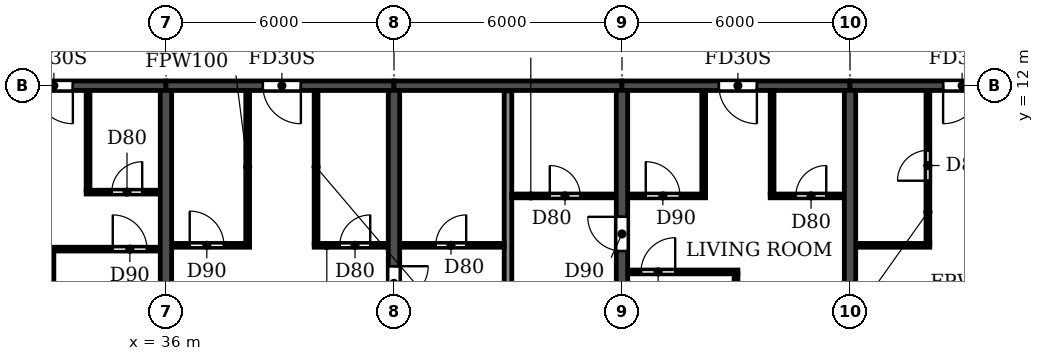
"""IFC4 building model, lengths in metres.
Left out: names, types, materials, properties, quantities, classifications, styles, units other than length and angle.
Written with IfcOpenShell. Run it as: python <this file> out.ifc"""

import sys

from ifc_helpers import new_model, si_unit, direction, frame, frame_2d, origin, place, context, subcontext, project, spatial, rectangle, extrude, element, fill, save


model = new_model("IFC4")
c1 = context("Model", 3, precision=1e-05, world=origin(), true_north=direction((0.0, 1.0)))
c2 = subcontext(c1, "Body", "Model", "MODEL_VIEW")
j1 = project(units=[si_unit("LENGTHUNIT", "METRE"), si_unit("PLANEANGLEUNIT", "RADIAN")], contexts=[c1])
p1 = place(None, origin())
s1 = spatial("IfcSite", under=j1, at=p1, CompositionType="ELEMENT")
p2 = place(p1, origin())
s2 = spatial("IfcBuilding", under=s1, at=p2, CompositionType="ELEMENT")
p3 = place(p2, frame((0.0, 0.0, 125.7)))
s3 = spatial("IfcBuildingStorey", under=s2, at=p3, CompositionType="ELEMENT", Elevation=125.7)
p4 = place(p3, frame((36.0, 0.2, 0.0), z_axis=(0.0, 0.0, 1.0), x_axis=(0.0, 1.0, 0.0)))
e1 = element("IfcWall", 1, at=p4, inside=s3, PredefinedType="SHEAR", context=c2, shape_type="SweptSolid", body=[
    extrude(rectangle(XDim=11.675, YDim=0.3, at=frame_2d((5.837, 0.0))), origin(), (0.0, 0.0, 1.0), 3.07),
])
p5 = place(p3, frame((42.0, 0.2, 0.0), z_axis=(0.0, 0.0, 1.0), x_axis=(0.0, 1.0, 0.0)))
e2 = element("IfcWall", 2, at=p5, inside=s3, PredefinedType="SHEAR", context=c2, shape_type="SweptSolid", body=[
    extrude(rectangle(XDim=11.675, YDim=0.3, at=frame_2d((5.837, 0.0))), origin(), (0.0, 0.0, 1.0), 3.07),
])
p6 = place(p5, frame((6.15, 0.0, 0.0)))
e3 = element("IfcOpeningElement", 3, at=p6, cuts=e2, PredefinedType="OPENING", context=c2, shape_type="SweptSolid", body=[
    extrude(rectangle(XDim=0.9, YDim=2.1, at=frame_2d((0.45, 1.05))), frame((0.0, 0.16, 0.0), z_axis=(0.0, -1.0, 0.0), x_axis=(1.0, 0.0, 0.0)), (0.0, 0.0, 1.0), 0.32),
])
p7 = place(p3, frame((48.0, 0.2, 0.0), z_axis=(0.0, 0.0, 1.0), x_axis=(0.0, 1.0, 0.0)))
e4 = element("IfcWall", 4, at=p7, inside=s3, PredefinedType="SHEAR", context=c2, shape_type="SweptSolid", body=[
    extrude(rectangle(XDim=11.675, YDim=0.3, at=frame_2d((5.837, 0.0))), origin(), (0.0, 0.0, 1.0), 3.07),
])
p8 = place(p7, frame((7.45, 0.0, 0.0)))
e5 = element("IfcOpeningElement", 5, at=p8, cuts=e4, PredefinedType="OPENING", context=c2, shape_type="SweptSolid", body=[
    extrude(rectangle(XDim=0.9, YDim=2.1, at=frame_2d((0.45, 1.05))), frame((0.0, 0.16, 0.0), z_axis=(0.0, -1.0, 0.0), x_axis=(1.0, 0.0, 0.0)), (0.0, 0.0, 1.0), 0.32),
])
p9 = place(p3, frame((54.0, 0.2, 0.0), z_axis=(0.0, 0.0, 1.0), x_axis=(0.0, 1.0, 0.0)))
e6 = element("IfcWall", 6, at=p9, inside=s3, PredefinedType="SHEAR", context=c2, shape_type="SweptSolid", body=[
    extrude(rectangle(XDim=11.675, YDim=0.3, at=frame_2d((5.837, 0.0))), origin(), (0.0, 0.0, 1.0), 3.07),
])
p10 = place(p3, frame((30.0, 12.0, 0.0), z_axis=(0.0, 0.0, 1.0), x_axis=(1.0, 0.0, 0.0)))
e7 = element("IfcWall", 7, at=p10, inside=s3, PredefinedType="SHEAR", context=c2, shape_type="SweptSolid", body=[
    extrude(rectangle(XDim=6.0, YDim=0.25, at=frame_2d((3.0, 0.0))), origin(), (0.0, 0.0, 1.0), 2.47),
])
p11 = place(p10, frame((2.55, 0.0, 0.0)))
e8 = element("IfcOpeningElement", 8, at=p11, cuts=e7, PredefinedType="OPENING", context=c2, shape_type="SweptSolid", body=[
    extrude(rectangle(XDim=1.0, YDim=2.1, at=frame_2d((0.5, 1.05))), frame((0.0, 0.135, 0.0), z_axis=(0.0, -1.0, 0.0), x_axis=(1.0, 0.0, 0.0)), (0.0, 0.0, 1.0), 0.27),
])
p12 = place(p3, frame((36.0, 12.0, 0.0), z_axis=(0.0, 0.0, 1.0), x_axis=(1.0, 0.0, 0.0)))
e9 = element("IfcWall", 9, at=p12, inside=s3, PredefinedType="SHEAR", context=c2, shape_type="SweptSolid", body=[
    extrude(rectangle(XDim=6.0, YDim=0.25, at=frame_2d((3.0, 0.0))), origin(), (0.0, 0.0, 1.0), 2.47),
])
p13 = place(p12, frame((2.55, 0.0, 0.0)))
e10 = element("IfcOpeningElement", 10, at=p13, cuts=e9, PredefinedType="OPENING", context=c2, shape_type="SweptSolid", body=[
    extrude(rectangle(XDim=1.0, YDim=2.1, at=frame_2d((0.5, 1.05))), frame((0.0, 0.135, 0.0), z_axis=(0.0, -1.0, 0.0), x_axis=(1.0, 0.0, 0.0)), (0.0, 0.0, 1.0), 0.27),
])
p14 = place(p3, frame((42.0, 12.0, 0.0), z_axis=(0.0, 0.0, 1.0), x_axis=(1.0, 0.0, 0.0)))
e11 = element("IfcWall", 11, at=p14, inside=s3, PredefinedType="SHEAR", context=c2, shape_type="SweptSolid", body=[
    extrude(rectangle(XDim=6.0, YDim=0.25, at=frame_2d((3.0, 0.0))), origin(), (0.0, 0.0, 1.0), 2.47),
])
p15 = place(p3, frame((48.0, 12.0, 0.0), z_axis=(0.0, 0.0, 1.0), x_axis=(1.0, 0.0, 0.0)))
e12 = element("IfcWall", 12, at=p15, inside=s3, PredefinedType="SHEAR", context=c2, shape_type="SweptSolid", body=[
    extrude(rectangle(XDim=6.0, YDim=0.25, at=frame_2d((3.0, 0.0))), origin(), (0.0, 0.0, 1.0), 2.47),
])
p16 = place(p15, frame((2.55, 0.0, 0.0)))
e13 = element("IfcOpeningElement", 13, at=p16, cuts=e12, PredefinedType="OPENING", context=c2, shape_type="SweptSolid", body=[
    extrude(rectangle(XDim=1.0, YDim=2.1, at=frame_2d((0.5, 1.05))), frame((0.0, 0.135, 0.0), z_axis=(0.0, -1.0, 0.0), x_axis=(1.0, 0.0, 0.0)), (0.0, 0.0, 1.0), 0.27),
])
p17 = place(p3, frame((54.0, 12.0, 0.0), z_axis=(0.0, 0.0, 1.0), x_axis=(1.0, 0.0, 0.0)))
e14 = element("IfcWall", 14, at=p17, inside=s3, PredefinedType="SHEAR", context=c2, shape_type="SweptSolid", body=[
    extrude(rectangle(XDim=6.0, YDim=0.25, at=frame_2d((3.0, 0.0))), origin(), (0.0, 0.0, 1.0), 2.47),
])
p18 = place(p17, frame((2.45, 0.0, 0.0)))
e15 = element("IfcOpeningElement", 15, at=p18, cuts=e14, PredefinedType="OPENING", context=c2, shape_type="SweptSolid", body=[
    extrude(rectangle(XDim=1.0, YDim=2.1, at=frame_2d((0.5, 1.05))), frame((0.0, 0.135, 0.0), z_axis=(0.0, -1.0, 0.0), x_axis=(1.0, 0.0, 0.0)), (0.0, 0.0, 1.0), 0.27),
])
p19 = place(p3, frame((45.0, 0.06, 0.0), z_axis=(0.0, 0.0, 1.0), x_axis=(0.0, 1.0, 0.0)))
e16 = element("IfcWall", 16, at=p19, inside=s3, PredefinedType="PARTITIONING", context=c2, shape_type="SweptSolid", body=[
    extrude(rectangle(XDim=11.805, YDim=0.2, at=frame_2d((5.902, 0.0))), origin(), (0.0, 0.0, 1.0), 3.07),
])
p20 = place(p3, frame((48.16, 7.1, 0.0), z_axis=(0.0, 0.0, 1.0), x_axis=(1.0, 0.0, 0.0)))
e17 = element("IfcWall", 17, at=p20, inside=s3, PredefinedType="PARTITIONING", context=c2, shape_type="SweptSolid", body=[
    extrude(rectangle(XDim=2.89, YDim=0.1, at=frame_2d((1.445, 0.0))), origin(), (0.0, 0.0, 1.0), 3.07),
])
p21 = place(p20, frame((0.34, 0.0, 0.0)))
e18 = element("IfcOpeningElement", 18, at=p21, cuts=e17, PredefinedType="OPENING", context=c2, shape_type="SweptSolid", body=[
    extrude(rectangle(XDim=0.9, YDim=2.1, at=frame_2d((0.45, 1.05))), frame((0.0, 0.06, 0.0), z_axis=(0.0, -1.0, 0.0), x_axis=(1.0, 0.0, 0.0)), (0.0, 0.0, 1.0), 0.12),
])
p22 = place(p3, frame((32.95, 7.7, 0.0), z_axis=(0.0, 0.0, 1.0), x_axis=(1.0, 0.0, 0.0)))
e19 = element("IfcWall", 19, at=p22, inside=s3, PredefinedType="PARTITIONING", context=c2, shape_type="SweptSolid", body=[
    extrude(rectangle(XDim=2.89, YDim=0.1, at=frame_2d((1.445, 0.0))), origin(), (0.0, 0.0, 1.0), 3.07),
])
p23 = place(p22, frame((1.65, 0.0, 0.0)))
e20 = element("IfcOpeningElement", 20, at=p23, cuts=e19, PredefinedType="OPENING", context=c2, shape_type="SweptSolid", body=[
    extrude(rectangle(XDim=0.9, YDim=2.1, at=frame_2d((0.45, 1.05))), frame((0.0, 0.06, 0.0), z_axis=(0.0, -1.0, 0.0), x_axis=(1.0, 0.0, 0.0)), (0.0, 0.0, 1.0), 0.12),
])
p24 = place(p3, frame((36.16, 7.8, 0.0), z_axis=(0.0, 0.0, 1.0), x_axis=(1.0, 0.0, 0.0)))
e21 = element("IfcWall", 21, at=p24, inside=s3, PredefinedType="PARTITIONING", context=c2, shape_type="SweptSolid", body=[
    extrude(rectangle(XDim=2.04, YDim=0.1, at=frame_2d((1.02, 0.0))), origin(), (0.0, 0.0, 1.0), 3.07),
])
p25 = place(p24, frame((0.465, 0.0, 0.0)))
e22 = element("IfcOpeningElement", 22, at=p25, cuts=e21, PredefinedType="OPENING", context=c2, shape_type="SweptSolid", body=[
    extrude(rectangle(XDim=0.9, YDim=2.1, at=frame_2d((0.45, 1.05))), frame((0.0, 0.06, 0.0), z_axis=(0.0, -1.0, 0.0), x_axis=(1.0, 0.0, 0.0)), (0.0, 0.0, 1.0), 0.12),
])
p26 = place(p3, frame((39.9, 7.8, 0.0), z_axis=(0.0, 0.0, 1.0), x_axis=(1.0, 0.0, 0.0)))
e23 = element("IfcWall", 23, at=p26, inside=s3, PredefinedType="PARTITIONING", context=c2, shape_type="SweptSolid", body=[
    extrude(rectangle(XDim=1.94, YDim=0.1, at=frame_2d((0.97, 0.0))), origin(), (0.0, 0.0, 1.0), 3.07),
])
p27 = place(p26, frame((0.675, 0.0, 0.0)))
e24 = element("IfcOpeningElement", 24, at=p27, cuts=e23, PredefinedType="OPENING", context=c2, shape_type="SweptSolid", body=[
    extrude(rectangle(XDim=0.8, YDim=2.1, at=frame_2d((0.4, 1.05))), frame((0.0, 0.06, 0.0), z_axis=(0.0, -1.0, 0.0), x_axis=(1.0, 0.0, 0.0)), (0.0, 0.0, 1.0), 0.12),
])
p28 = place(p3, frame((42.16, 7.8, 0.0), z_axis=(0.0, 0.0, 1.0), x_axis=(1.0, 0.0, 0.0)))
e25 = element("IfcWall", 25, at=p28, inside=s3, PredefinedType="PARTITIONING", context=c2, shape_type="SweptSolid", body=[
    extrude(rectangle(XDim=2.74, YDim=0.1, at=frame_2d((1.37, 0.0))), origin(), (0.0, 0.0, 1.0), 3.07),
])
p29 = place(p28, frame((0.94, 0.0, 0.0)))
e26 = element("IfcOpeningElement", 26, at=p29, cuts=e25, PredefinedType="OPENING", context=c2, shape_type="SweptSolid", body=[
    extrude(rectangle(XDim=0.8, YDim=2.1, at=frame_2d((0.4, 1.05))), frame((0.0, 0.06, 0.0), z_axis=(0.0, -1.0, 0.0), x_axis=(1.0, 0.0, 0.0)), (0.0, 0.0, 1.0), 0.12),
])
p30 = place(p3, frame((54.16, 7.8, 0.0), z_axis=(0.0, 0.0, 1.0), x_axis=(1.0, 0.0, 0.0)))
e27 = element("IfcWall", 27, at=p30, inside=s3, PredefinedType="PARTITIONING", context=c2, shape_type="SweptSolid", body=[
    extrude(rectangle(XDim=1.94, YDim=0.1, at=frame_2d((0.97, 0.0))), origin(), (0.0, 0.0, 1.0), 3.07),
])
p31 = place(p3, frame((45.1, 9.1, 0.0), z_axis=(0.0, 0.0, 1.0), x_axis=(1.0, 0.0, 0.0)))
e28 = element("IfcWall", 28, at=p31, inside=s3, PredefinedType="PARTITIONING", context=c2, shape_type="SweptSolid", body=[
    extrude(rectangle(XDim=2.74, YDim=0.1, at=frame_2d((1.37, 0.0))), origin(), (0.0, 0.0, 1.0), 3.07),
])
p32 = place(p31, frame((1.0, 0.0, 0.0)))
e29 = element("IfcOpeningElement", 29, at=p32, cuts=e28, PredefinedType="OPENING", context=c2, shape_type="SweptSolid", body=[
    extrude(rectangle(XDim=0.8, YDim=2.1, at=frame_2d((0.4, 1.05))), frame((0.0, 0.06, 0.0), z_axis=(0.0, -1.0, 0.0), x_axis=(1.0, 0.0, 0.0)), (0.0, 0.0, 1.0), 0.12),
])
p33 = place(p3, frame((48.16, 9.1, 0.0), z_axis=(0.0, 0.0, 1.0), x_axis=(1.0, 0.0, 0.0)))
e30 = element("IfcWall", 30, at=p33, inside=s3, PredefinedType="PARTITIONING", context=c2, shape_type="SweptSolid", body=[
    extrude(rectangle(XDim=2.04, YDim=0.1, at=frame_2d((1.02, 0.0))), origin(), (0.0, 0.0, 1.0), 3.07),
])
p34 = place(p33, frame((0.465, 0.0, 0.0)))
e31 = element("IfcOpeningElement", 31, at=p34, cuts=e30, PredefinedType="OPENING", context=c2, shape_type="SweptSolid", body=[
    extrude(rectangle(XDim=0.9, YDim=2.1, at=frame_2d((0.45, 1.05))), frame((0.0, 0.06, 0.0), z_axis=(0.0, -1.0, 0.0), x_axis=(1.0, 0.0, 0.0)), (0.0, 0.0, 1.0), 0.12),
])
p35 = place(p3, frame((51.9, 9.1, 0.0), z_axis=(0.0, 0.0, 1.0), x_axis=(1.0, 0.0, 0.0)))
e32 = element("IfcWall", 32, at=p35, inside=s3, PredefinedType="PARTITIONING", context=c2, shape_type="SweptSolid", body=[
    extrude(rectangle(XDim=1.94, YDim=0.1, at=frame_2d((0.97, 0.0))), origin(), (0.0, 0.0, 1.0), 3.07),
])
p36 = place(p35, frame((0.675, 0.0, 0.0)))
e33 = element("IfcOpeningElement", 33, at=p36, cuts=e32, PredefinedType="OPENING", context=c2, shape_type="SweptSolid", body=[
    extrude(rectangle(XDim=0.8, YDim=2.1, at=frame_2d((0.4, 1.05))), frame((0.0, 0.06, 0.0), z_axis=(0.0, -1.0, 0.0), x_axis=(1.0, 0.0, 0.0)), (0.0, 0.0, 1.0), 0.12),
])
p37 = place(p3, frame((33.9, 9.2, 0.0), z_axis=(0.0, 0.0, 1.0), x_axis=(1.0, 0.0, 0.0)))
e34 = element("IfcWall", 34, at=p37, inside=s3, PredefinedType="PARTITIONING", context=c2, shape_type="SweptSolid", body=[
    extrude(rectangle(XDim=1.94, YDim=0.1, at=frame_2d((0.97, 0.0))), origin(), (0.0, 0.0, 1.0), 3.07),
])
p38 = place(p37, frame((0.675, 0.0, 0.0)))
e35 = element("IfcOpeningElement", 35, at=p38, cuts=e34, PredefinedType="OPENING", context=c2, shape_type="SweptSolid", body=[
    extrude(rectangle(XDim=0.8, YDim=2.1, at=frame_2d((0.4, 1.05))), frame((0.0, 0.06, 0.0), z_axis=(0.0, -1.0, 0.0), x_axis=(1.0, 0.0, 0.0)), (0.0, 0.0, 1.0), 0.12),
])
p39 = place(p3, frame((33.0, 0.06, 0.0), z_axis=(0.0, 0.0, 1.0), x_axis=(0.0, 1.0, 0.0)))
e36 = element("IfcWall", 36, at=p39, inside=s3, PredefinedType="PARTITIONING", context=c2, shape_type="SweptSolid", body=[
    extrude(rectangle(XDim=7.59, YDim=0.1, at=frame_2d((3.795, 0.0))), origin(), (0.0, 0.0, 1.0), 3.07),
])
p40 = place(p3, frame((33.95, 9.25, 0.0), z_axis=(0.0, 0.0, 1.0), x_axis=(0.0, 1.0, 0.0)))
e37 = element("IfcWall", 37, at=p40, inside=s3, PredefinedType="PARTITIONING", context=c2, shape_type="SweptSolid", body=[
    extrude(rectangle(XDim=2.615, YDim=0.1, at=frame_2d((1.308, 0.0))), origin(), (0.0, 0.0, 1.0), 3.07),
])
for number, where, z_axis, x_axis in (
    (38, (38.15, 7.85, 0.0), (0.0, 0.0, 1.0), (0.0, 1.0, 0.0)),
    (39, (39.95, 7.85, 0.0), (0.0, 0.0, 1.0), (0.0, 1.0, 0.0)),
):
    element("IfcWall", number, at=place(p3, frame(where, z_axis=z_axis, x_axis=x_axis)), inside=s3, PredefinedType="PARTITIONING", context=c2, shape_type="SweptSolid", body=[
        extrude(rectangle(XDim=4.015, YDim=0.1, at=frame_2d((2.007, 0.0))), origin(), (0.0, 0.0, 1.0), 3.07),
    ])
p41 = place(p3, frame((50.15, 9.15, 0.0), z_axis=(0.0, 0.0, 1.0), x_axis=(0.0, 1.0, 0.0)))
e40 = element("IfcWall", 40, at=p41, inside=s3, PredefinedType="PARTITIONING", context=c2, shape_type="SweptSolid", body=[
    extrude(rectangle(XDim=2.715, YDim=0.1, at=frame_2d((1.357, 0.0))), origin(), (0.0, 0.0, 1.0), 3.07),
])
p42 = place(p3, frame((51.0, 0.06, 0.0), z_axis=(0.0, 0.0, 1.0), x_axis=(0.0, 1.0, 0.0)))
e41 = element("IfcWall", 41, at=p42, inside=s3, PredefinedType="PARTITIONING", context=c2, shape_type="SweptSolid", body=[
    extrude(rectangle(XDim=6.99, YDim=0.1, at=frame_2d((3.495, 0.0))), origin(), (0.0, 0.0, 1.0), 3.07),
])
p43 = place(p3, frame((51.95, 9.15, 0.0), z_axis=(0.0, 0.0, 1.0), x_axis=(0.0, 1.0, 0.0)))
e42 = element("IfcWall", 42, at=p43, inside=s3, PredefinedType="PARTITIONING", context=c2, shape_type="SweptSolid", body=[
    extrude(rectangle(XDim=2.715, YDim=0.1, at=frame_2d((1.357, 0.0))), origin(), (0.0, 0.0, 1.0), 3.07),
])
p44 = place(p3, frame((56.05, 7.85, 0.0), z_axis=(0.0, 0.0, 1.0), x_axis=(0.0, 1.0, 0.0)))
e43 = element("IfcWall", 43, at=p44, inside=s3, PredefinedType="PARTITIONING", context=c2, shape_type="SweptSolid", body=[
    extrude(rectangle(XDim=4.015, YDim=0.1, at=frame_2d((2.007, 0.0))), origin(), (0.0, 0.0, 1.0), 3.07),
])
p45 = place(p44, frame((1.65, 0.0, 0.0)))
e44 = element("IfcOpeningElement", 44, at=p45, cuts=e43, PredefinedType="OPENING", context=c2, shape_type="SweptSolid", body=[
    extrude(rectangle(XDim=0.8, YDim=2.1, at=frame_2d((0.4, 1.05))), frame((0.0, 0.06, 0.0), z_axis=(0.0, -1.0, 0.0), x_axis=(1.0, 0.0, 0.0)), (0.0, 0.0, 1.0), 0.12),
])
p46 = place(p11, frame((1.0, 0.0, 0.0), z_axis=(0.0, 0.0, 1.0), x_axis=(-1.0, 0.0, 0.0)))
e45 = element("IfcDoor", 45, at=p46, inside=s3, OperationType="SINGLE_SWING_LEFT", PredefinedType="DOOR", context=c2, shape_type="SweptSolid", body=[
    extrude(rectangle(XDim=1.0, YDim=2.1, at=frame_2d((0.5, 1.05))), frame((0.0, 0.025, 0.0), z_axis=(0.0, -1.0, 0.0), x_axis=(1.0, 0.0, 0.0)), (0.0, 0.0, 1.0), 0.05),
])
fill(e8, e45)
p47 = place(p38, origin())
e46 = element("IfcDoor", 46, at=p47, inside=s3, OperationType="SINGLE_SWING_RIGHT", PredefinedType="DOOR", context=c2, shape_type="SweptSolid", body=[
    extrude(rectangle(XDim=0.8, YDim=2.1, at=frame_2d((0.4, 1.05))), frame((0.0, 0.025, 0.0), z_axis=(0.0, -1.0, 0.0), x_axis=(1.0, 0.0, 0.0)), (0.0, 0.0, 1.0), 0.05),
])
fill(e35, e46)
p48 = place(p23, origin())
e47 = element("IfcDoor", 47, at=p48, inside=s3, OperationType="SINGLE_SWING_LEFT", PredefinedType="DOOR", context=c2, shape_type="SweptSolid", body=[
    extrude(rectangle(XDim=0.9, YDim=2.1, at=frame_2d((0.45, 1.05))), frame((0.0, 0.025, 0.0), z_axis=(0.0, -1.0, 0.0), x_axis=(1.0, 0.0, 0.0)), (0.0, 0.0, 1.0), 0.05),
])
fill(e20, e47)
p49 = place(p29, origin())
e48 = element("IfcDoor", 48, at=p49, inside=s3, OperationType="SINGLE_SWING_RIGHT", PredefinedType="DOOR", context=c2, shape_type="SweptSolid", body=[
    extrude(rectangle(XDim=0.8, YDim=2.1, at=frame_2d((0.4, 1.05))), frame((0.0, 0.025, 0.0), z_axis=(0.0, -1.0, 0.0), x_axis=(1.0, 0.0, 0.0)), (0.0, 0.0, 1.0), 0.05),
])
fill(e26, e48)
p50 = place(p25, origin())
e49 = element("IfcDoor", 49, at=p50, inside=s3, OperationType="SINGLE_SWING_LEFT", PredefinedType="DOOR", context=c2, shape_type="SweptSolid", body=[
    extrude(rectangle(XDim=0.9, YDim=2.1, at=frame_2d((0.45, 1.05))), frame((0.0, 0.025, 0.0), z_axis=(0.0, -1.0, 0.0), x_axis=(1.0, 0.0, 0.0)), (0.0, 0.0, 1.0), 0.05),
])
fill(e22, e49)
p51 = place(p13, frame((1.0, 0.0, 0.0), z_axis=(0.0, 0.0, 1.0), x_axis=(-1.0, 0.0, 0.0)))
e50 = element("IfcDoor", 50, at=p51, inside=s3, OperationType="SINGLE_SWING_LEFT", PredefinedType="DOOR", context=c2, shape_type="SweptSolid", body=[
    extrude(rectangle(XDim=1.0, YDim=2.1, at=frame_2d((0.5, 1.05))), frame((0.0, 0.025, 0.0), z_axis=(0.0, -1.0, 0.0), x_axis=(1.0, 0.0, 0.0)), (0.0, 0.0, 1.0), 0.05),
])
fill(e10, e50)
p52 = place(p27, origin())
e51 = element("IfcDoor", 51, at=p52, inside=s3, OperationType="SINGLE_SWING_RIGHT", PredefinedType="DOOR", context=c2, shape_type="SweptSolid", body=[
    extrude(rectangle(XDim=0.8, YDim=2.1, at=frame_2d((0.4, 1.05))), frame((0.0, 0.025, 0.0), z_axis=(0.0, -1.0, 0.0), x_axis=(1.0, 0.0, 0.0)), (0.0, 0.0, 1.0), 0.05),
])
fill(e24, e51)
p53 = place(p6, frame((0.9, 0.0, 0.0), z_axis=(0.0, 0.0, 1.0), x_axis=(-1.0, 0.0, 0.0)))
e52 = element("IfcDoor", 52, at=p53, inside=s3, OperationType="SINGLE_SWING_LEFT", PredefinedType="DOOR", context=c2, shape_type="SweptSolid", body=[
    extrude(rectangle(XDim=0.9, YDim=2.1, at=frame_2d((0.45, 1.05))), frame((0.0, 0.025, 0.0), z_axis=(0.0, -1.0, 0.0), x_axis=(1.0, 0.0, 0.0)), (0.0, 0.0, 1.0), 0.05),
])
fill(e3, e52)
p54 = place(p32, origin())
e53 = element("IfcDoor", 53, at=p54, inside=s3, OperationType="SINGLE_SWING_LEFT", PredefinedType="DOOR", context=c2, shape_type="SweptSolid", body=[
    extrude(rectangle(XDim=0.8, YDim=2.1, at=frame_2d((0.4, 1.05))), frame((0.0, 0.025, 0.0), z_axis=(0.0, -1.0, 0.0), x_axis=(1.0, 0.0, 0.0)), (0.0, 0.0, 1.0), 0.05),
])
fill(e29, e53)
p55 = place(p8, origin())
e54 = element("IfcDoor", 54, at=p55, inside=s3, OperationType="SINGLE_SWING_RIGHT", PredefinedType="DOOR", context=c2, shape_type="SweptSolid", body=[
    extrude(rectangle(XDim=0.9, YDim=2.1, at=frame_2d((0.45, 1.05))), frame((0.0, 0.025, 0.0), z_axis=(0.0, -1.0, 0.0), x_axis=(1.0, 0.0, 0.0)), (0.0, 0.0, 1.0), 0.05),
])
fill(e5, e54)
p56 = place(p21, origin())
e55 = element("IfcDoor", 55, at=p56, inside=s3, OperationType="SINGLE_SWING_RIGHT", PredefinedType="DOOR", context=c2, shape_type="SweptSolid", body=[
    extrude(rectangle(XDim=0.9, YDim=2.1, at=frame_2d((0.45, 1.05))), frame((0.0, 0.025, 0.0), z_axis=(0.0, -1.0, 0.0), x_axis=(1.0, 0.0, 0.0)), (0.0, 0.0, 1.0), 0.05),
])
fill(e18, e55)
p57 = place(p34, origin())
e56 = element("IfcDoor", 56, at=p57, inside=s3, OperationType="SINGLE_SWING_LEFT", PredefinedType="DOOR", context=c2, shape_type="SweptSolid", body=[
    extrude(rectangle(XDim=0.9, YDim=2.1, at=frame_2d((0.45, 1.05))), frame((0.0, 0.025, 0.0), z_axis=(0.0, -1.0, 0.0), x_axis=(1.0, 0.0, 0.0)), (0.0, 0.0, 1.0), 0.05),
])
fill(e31, e56)
p58 = place(p16, frame((1.0, 0.0, 0.0), z_axis=(0.0, 0.0, 1.0), x_axis=(-1.0, 0.0, 0.0)))
e57 = element("IfcDoor", 57, at=p58, inside=s3, OperationType="SINGLE_SWING_LEFT", PredefinedType="DOOR", context=c2, shape_type="SweptSolid", body=[
    extrude(rectangle(XDim=1.0, YDim=2.1, at=frame_2d((0.5, 1.05))), frame((0.0, 0.025, 0.0), z_axis=(0.0, -1.0, 0.0), x_axis=(1.0, 0.0, 0.0)), (0.0, 0.0, 1.0), 0.05),
])
fill(e13, e57)
p59 = place(p36, origin())
e58 = element("IfcDoor", 58, at=p59, inside=s3, OperationType="SINGLE_SWING_RIGHT", PredefinedType="DOOR", context=c2, shape_type="SweptSolid", body=[
    extrude(rectangle(XDim=0.8, YDim=2.1, at=frame_2d((0.4, 1.05))), frame((0.0, 0.025, 0.0), z_axis=(0.0, -1.0, 0.0), x_axis=(1.0, 0.0, 0.0)), (0.0, 0.0, 1.0), 0.05),
])
fill(e33, e58)
p60 = place(p45, origin())
e59 = element("IfcDoor", 59, at=p60, inside=s3, OperationType="SINGLE_SWING_LEFT", PredefinedType="DOOR", context=c2, shape_type="SweptSolid", body=[
    extrude(rectangle(XDim=0.8, YDim=2.1, at=frame_2d((0.4, 1.05))), frame((0.0, 0.025, 0.0), z_axis=(0.0, -1.0, 0.0), x_axis=(1.0, 0.0, 0.0)), (0.0, 0.0, 1.0), 0.05),
])
fill(e44, e59)
p61 = place(p18, frame((1.0, 0.0, 0.0), z_axis=(0.0, 0.0, 1.0), x_axis=(-1.0, 0.0, 0.0)))
e60 = element("IfcDoor", 60, at=p61, inside=s3, OperationType="SINGLE_SWING_RIGHT", PredefinedType="DOOR", context=c2, shape_type="SweptSolid", body=[
    extrude(rectangle(XDim=1.0, YDim=2.1, at=frame_2d((0.5, 1.05))), frame((0.0, 0.025, 0.0), z_axis=(0.0, -1.0, 0.0), x_axis=(1.0, 0.0, 0.0)), (0.0, 0.0, 1.0), 0.05),
])
fill(e15, e60)
save(model, sys.argv[1])
